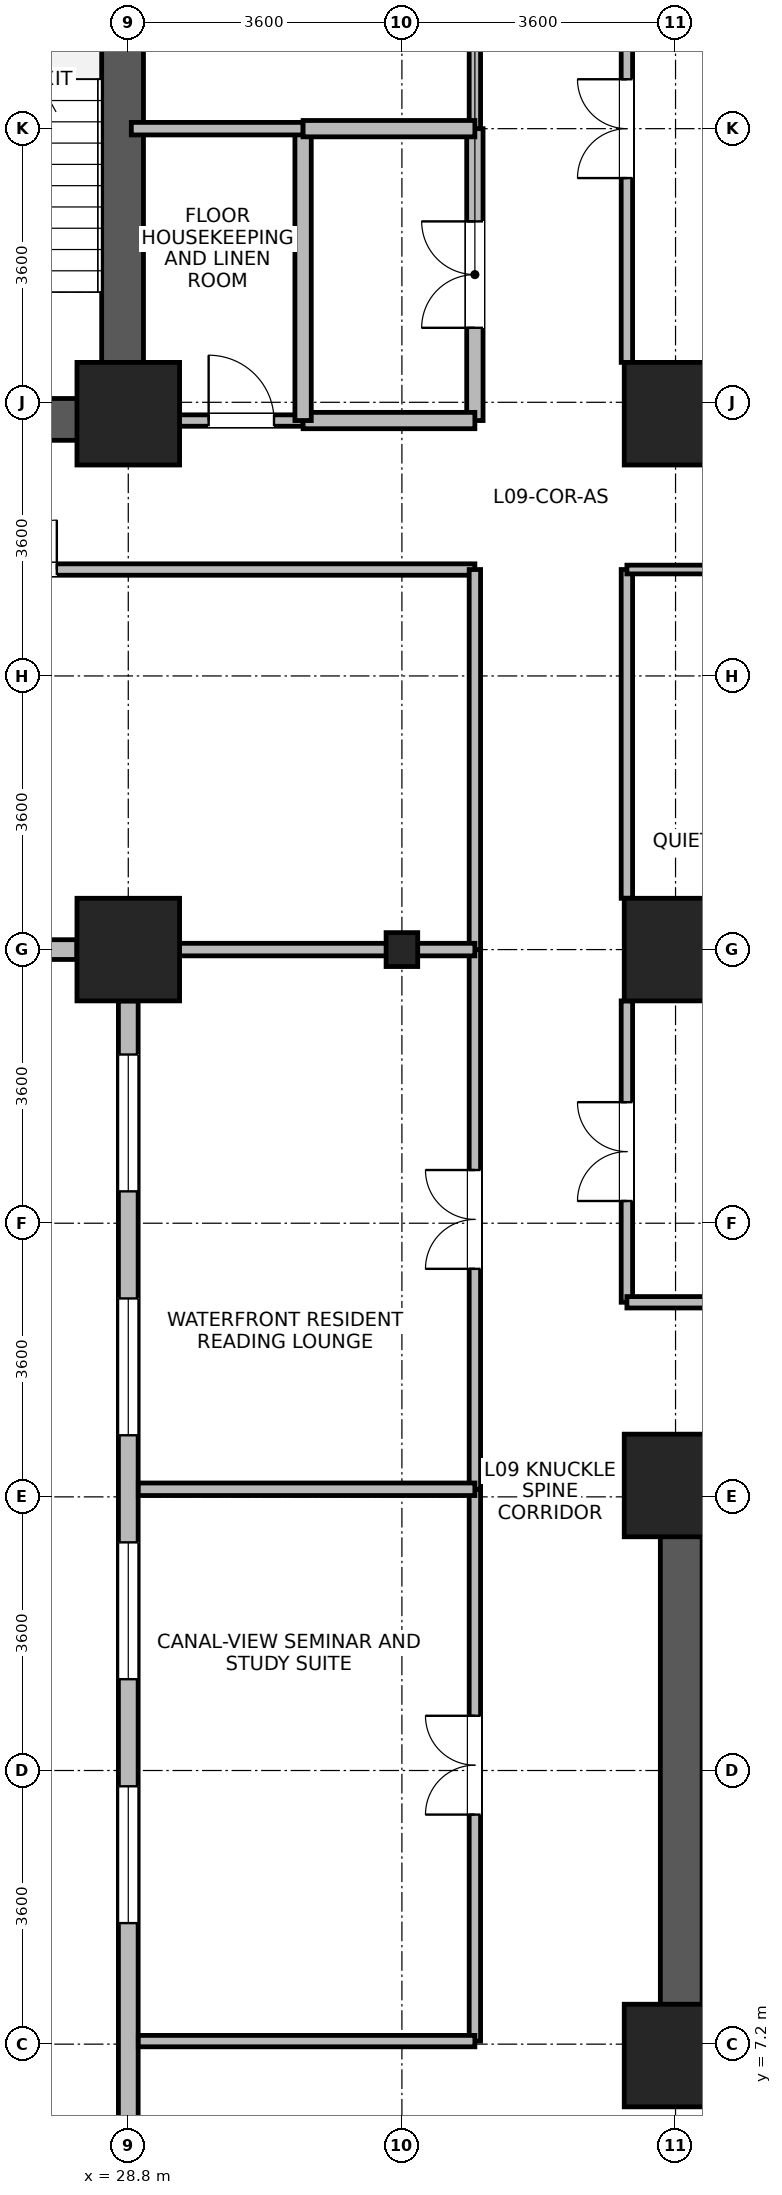
"""IFC4 building model, lengths in metres.
Left out: names, types, materials, properties, quantities, classifications, styles, units other than length and angle.
Written with IfcOpenShell. Run it as: python <this file> out.ifc"""

import sys

from ifc_helpers import new_model, si_unit, direction, frame, frame_2d, origin, origin_2d, place, context, subcontext, project, spatial, rectangle, i_section, extrude, source, transform, mapped, element, fill, save


model = new_model("IFC4")
c1 = context("Model", 3, precision=1e-05, world=origin(), true_north=direction((0.0, 1.0)))
c2 = subcontext(c1, "Body", "Model", "MODEL_VIEW")
j1 = project(units=[si_unit("LENGTHUNIT", "METRE"), si_unit("PLANEANGLEUNIT", "RADIAN")], contexts=[c1])
p1 = place(None, origin())
s1 = spatial("IfcSite", under=j1, at=p1, CompositionType="ELEMENT")
p2 = place(p1, origin())
s2 = spatial("IfcBuilding", under=s1, at=p2, CompositionType="ELEMENT")
p3 = place(p2, frame((0.0, 0.0, 40.1)))
s3 = spatial("IfcBuildingStorey", under=s2, at=p3, CompositionType="ELEMENT", Elevation=40.1)
p4 = place(p3, frame((28.725, 28.3, 0.0), z_axis=(0.0, 0.0, 1.0), x_axis=(0.0, 1.0, 0.0)))
e1 = element("IfcWall", 1, at=p4, inside=s3, PredefinedType="SHEAR", context=c2, shape_type="SweptSolid", body=[
    extrude(rectangle(XDim=8.1, YDim=0.55, at=frame_2d((4.05, 0.0))), origin(), (0.0, 0.0, 1.0), 3.45),
])
p5 = place(p3, frame((25.25, 28.575, 0.0), z_axis=(0.0, 0.0, 1.0), x_axis=(1.0, 0.0, 0.0)))
e2 = element("IfcWall", 2, at=p5, inside=s3, PredefinedType="SHEAR", context=c2, shape_type="SweptSolid", body=[
    extrude(rectangle(XDim=3.2, YDim=0.55, at=frame_2d((1.6, 0.0))), origin(), (0.0, 0.0, 1.0), 3.45),
])
p6 = place(p3, frame((36.075, 6.75, 0.0), z_axis=(0.0, 0.0, 1.0), x_axis=(0.0, 1.0, 0.0)))
e3 = element("IfcWall", 3, at=p6, inside=s3, PredefinedType="SHEAR", context=c2, shape_type="SweptSolid", body=[
    extrude(rectangle(XDim=8.1, YDim=0.55, at=frame_2d((4.05, 0.0))), origin(), (0.0, 0.0, 1.0), 3.45),
])
m1 = source(origin(), c2, "Body", "SweptSolid", [
    extrude(rectangle(XDim=1.35, YDim=1.35, at=origin_2d()), origin(), (0.0, 0.0, 1.0), 3.7),
])
for number, where, z_axis, x_axis in (
    (4, (28.8, 21.6, 0.0), (0.0, 0.0, 1.0), (1.0, 0.0, 0.0)),
    (5, (28.8, 28.65, 0.0), (0.0, 0.0, 1.0), (1.0, 0.0, 0.0)),
    (6, (36.0, 21.6, 0.0), (0.0, 0.0, 1.0), (1.0, 0.0, 0.0)),
    (7, (36.0, 28.65, 0.0), (0.0, 0.0, 1.0), (1.0, 0.0, 0.0)),
    (8, (36.0, 7.05, 0.0), (0.0, 0.0, 1.0), (1.0, 0.0, 0.0)),
    (9, (36.0, 14.55, 0.0), (0.0, 0.0, 1.0), (1.0, 0.0, 0.0)),
):
    element("IfcColumn", number, at=place(p3, frame(where, z_axis=z_axis, x_axis=x_axis)), inside=s3, PredefinedType="COLUMN", context=c2, shape_type="MappedRepresentation", body=[
        mapped(m1, transform((0.0, 0.0, 0.0), x_axis=(1.0, 0.0, 0.0), y_axis=(0.0, 1.0, 0.0), z_axis=(0.0, 0.0, 1.0), scale=1.0)),
    ])
m2 = source(origin(), c2, "Body", "SweptSolid", [
    extrude(i_section(OverallWidth=0.416, OverallDepth=0.446, WebThickness=0.029, FlangeThickness=0.04, FilletRadius=0.015, at=origin_2d()), origin(), (0.0, 0.0, 1.0), 3.7),
])
p7 = place(p3, frame((32.4, 21.6, 0.0), z_axis=(0.0, 0.0, 1.0), x_axis=(1.0, 0.0, 0.0)))
e10 = element("IfcColumn", 10, at=p7, inside=s3, PredefinedType="COLUMN", context=c2, shape_type="MappedRepresentation", body=[
    mapped(m2, transform((0.0, 0.0, 0.0), x_axis=(1.0, 0.0, 0.0), y_axis=(0.0, 1.0, 0.0), z_axis=(0.0, 0.0, 1.0), scale=1.0)),
])
p8 = place(p3, frame((28.124, 21.6, 0.0), z_axis=(0.0, 0.0, 1.0), x_axis=(-1.0, 0.0, 0.0)))
e11 = element("IfcWall", 11, at=p8, inside=s3, PredefinedType="STANDARD", context=c2, shape_type="SweptSolid", body=[
    extrude(rectangle(XDim=2.715, YDim=0.26, at=frame_2d((1.357, 0.0))), origin(), (0.0, 0.0, 1.0), 2.93),
])
p9 = place(p8, frame((0.883, 0.0, 0.85)))
e12 = element("IfcOpeningElement", 12, at=p9, cuts=e11, PredefinedType="OPENING", context=c2, shape_type="SweptSolid", body=[
    extrude(rectangle(XDim=0.95, YDim=1.75, at=frame_2d((0.475, 0.875))), frame((0.0, 0.14, 0.0), z_axis=(0.0, -1.0, 0.0), x_axis=(1.0, 0.0, 0.0)), (0.0, 0.0, 1.0), 0.28),
])
p10 = place(p3, frame((28.8, 1.67, 0.0), z_axis=(0.0, 0.0, 1.0), x_axis=(0.0, 1.0, 0.0)))
e13 = element("IfcWall", 13, at=p10, inside=s3, PredefinedType="STANDARD", context=c2, shape_type="SweptSolid", body=[
    extrude(rectangle(XDim=19.254, YDim=0.26, at=frame_2d((9.627, 0.0))), origin(), (0.0, 0.0, 1.0), 3.43),
])
p11 = place(p10, frame((0.705, 0.0, 0.85)))
e14 = element("IfcOpeningElement", 14, at=p11, cuts=e13, PredefinedType="OPENING", context=c2, shape_type="SweptSolid", body=[
    extrude(rectangle(XDim=1.8, YDim=1.85, at=frame_2d((0.9, 0.925))), frame((0.0, 0.14, 0.0), z_axis=(0.0, -1.0, 0.0), x_axis=(1.0, 0.0, 0.0)), (0.0, 0.0, 1.0), 0.28),
])
p12 = place(p10, frame((7.123, 0.0, 0.85)))
e15 = element("IfcOpeningElement", 15, at=p12, cuts=e13, PredefinedType="OPENING", context=c2, shape_type="SweptSolid", body=[
    extrude(rectangle(XDim=1.8, YDim=1.85, at=frame_2d((0.9, 0.925))), frame((0.0, 0.14, 0.0), z_axis=(0.0, -1.0, 0.0), x_axis=(1.0, 0.0, 0.0)), (0.0, 0.0, 1.0), 0.28),
])
p13 = place(p10, frame((10.332, 0.0, 0.85)))
e16 = element("IfcOpeningElement", 16, at=p13, cuts=e13, PredefinedType="OPENING", context=c2, shape_type="SweptSolid", body=[
    extrude(rectangle(XDim=1.8, YDim=1.85, at=frame_2d((0.9, 0.925))), frame((0.0, 0.14, 0.0), z_axis=(0.0, -1.0, 0.0), x_axis=(1.0, 0.0, 0.0)), (0.0, 0.0, 1.0), 0.28),
])
p14 = place(p10, frame((13.541, 0.0, 0.85)))
e17 = element("IfcOpeningElement", 17, at=p14, cuts=e13, PredefinedType="OPENING", context=c2, shape_type="SweptSolid", body=[
    extrude(rectangle(XDim=1.8, YDim=1.85, at=frame_2d((0.9, 0.925))), frame((0.0, 0.14, 0.0), z_axis=(0.0, -1.0, 0.0), x_axis=(1.0, 0.0, 0.0)), (0.0, 0.0, 1.0), 0.28),
])
p15 = place(p10, frame((16.75, 0.0, 0.85)))
e18 = element("IfcOpeningElement", 18, at=p15, cuts=e13, PredefinedType="OPENING", context=c2, shape_type="SweptSolid", body=[
    extrude(rectangle(XDim=1.8, YDim=1.85, at=frame_2d((0.9, 0.925))), frame((0.0, 0.14, 0.0), z_axis=(0.0, -1.0, 0.0), x_axis=(1.0, 0.0, 0.0)), (0.0, 0.0, 1.0), 0.28),
])
p16 = place(p3, frame((21.06, 26.6, 0.0), z_axis=(0.0, 0.0, 1.0), x_axis=(1.0, 0.0, 0.0)))
e19 = element("IfcWall", 19, at=p16, inside=s3, PredefinedType="PARTITIONING", context=c2, shape_type="SweptSolid", body=[
    extrude(rectangle(XDim=12.3, YDim=0.15, at=frame_2d((6.15, 0.0))), origin(), (0.0, 0.0, 1.0), 3.43),
])
p17 = place(p16, frame((5.5, 0.0, 0.0)))
e20 = element("IfcOpeningElement", 20, at=p17, cuts=e19, PredefinedType="OPENING", context=c2, shape_type="SweptSolid", body=[
    extrude(rectangle(XDim=1.3, YDim=2.12, at=frame_2d((0.65, 1.06))), frame((0.0, 0.085, 0.0), z_axis=(0.0, -1.0, 0.0), x_axis=(1.0, 0.0, 0.0)), (0.0, 0.0, 1.0), 0.17),
])
p18 = place(p3, frame((35.36, 16.96, 0.0), z_axis=(0.0, 0.0, 1.0), x_axis=(0.0, 1.0, 0.0)))
e21 = element("IfcWall", 21, at=p18, inside=s3, PredefinedType="PARTITIONING", context=c2, shape_type="SweptSolid", body=[
    extrude(rectangle(XDim=3.965, YDim=0.15, at=frame_2d((1.982, 0.0))), origin(), (0.0, 0.0, 1.0), 3.43),
])
p19 = place(p18, frame((1.333, 0.0, 0.0)))
e22 = element("IfcOpeningElement", 22, at=p19, cuts=e21, PredefinedType="OPENING", context=c2, shape_type="SweptSolid", body=[
    extrude(rectangle(XDim=1.3, YDim=2.12, at=frame_2d((0.65, 1.06))), frame((0.0, 0.085, 0.0), z_axis=(0.0, -1.0, 0.0), x_axis=(1.0, 0.0, 0.0)), (0.0, 0.0, 1.0), 0.17),
])
p20 = place(p3, frame((35.36, 22.275, 0.0), z_axis=(0.0, 0.0, 1.0), x_axis=(0.0, 1.0, 0.0)))
e23 = element("IfcWall", 23, at=p20, inside=s3, PredefinedType="PARTITIONING", context=c2, shape_type="SweptSolid", body=[
    extrude(rectangle(XDim=4.325, YDim=0.15, at=frame_2d((2.163, 0.0))), origin(), (0.0, 0.0, 1.0), 3.43),
])
p21 = place(p3, frame((35.36, 29.325, 0.0), z_axis=(0.0, 0.0, 1.0), x_axis=(0.0, 1.0, 0.0)))
e24 = element("IfcWall", 24, at=p21, inside=s3, PredefinedType="PARTITIONING", context=c2, shape_type="SweptSolid", body=[
    extrude(rectangle(XDim=6.15, YDim=0.15, at=frame_2d((3.075, 0.0))), origin(), (0.0, 0.0, 1.0), 3.43),
])
p22 = place(p21, frame((2.425, 0.0, 0.0)))
e25 = element("IfcOpeningElement", 25, at=p22, cuts=e24, PredefinedType="OPENING", context=c2, shape_type="SweptSolid", body=[
    extrude(rectangle(XDim=1.3, YDim=2.12, at=frame_2d((0.65, 1.06))), frame((0.0, 0.085, 0.0), z_axis=(0.0, -1.0, 0.0), x_axis=(1.0, 0.0, 0.0)), (0.0, 0.0, 1.0), 0.17),
])
p23 = place(p3, frame((33.36, 7.24, 0.0), z_axis=(0.0, 0.0, 1.0), x_axis=(0.0, 1.0, 0.0)))
e26 = element("IfcWall", 26, at=p23, inside=s3, PredefinedType="PARTITIONING", context=c2, shape_type="SweptSolid", body=[
    extrude(rectangle(XDim=7.26, YDim=0.15, at=frame_2d((3.63, 0.0))), origin(), (0.0, 0.0, 1.0), 3.43),
])
p24 = place(p23, frame((2.98, 0.0, 0.0)))
e27 = element("IfcOpeningElement", 27, at=p24, cuts=e26, PredefinedType="OPENING", context=c2, shape_type="SweptSolid", body=[
    extrude(rectangle(XDim=1.3, YDim=2.12, at=frame_2d((0.65, 1.06))), frame((0.0, 0.085, 0.0), z_axis=(0.0, -1.0, 0.0), x_axis=(1.0, 0.0, 0.0)), (0.0, 0.0, 1.0), 0.17),
])
p25 = place(p3, frame((33.36, 14.5, 0.0), z_axis=(0.0, 0.0, 1.0), x_axis=(0.0, 1.0, 0.0)))
e28 = element("IfcWall", 28, at=p25, inside=s3, PredefinedType="PARTITIONING", context=c2, shape_type="SweptSolid", body=[
    extrude(rectangle(XDim=7.1, YDim=0.15, at=frame_2d((3.55, 0.0))), origin(), (0.0, 0.0, 1.0), 3.43),
])
p26 = place(p25, frame((2.9, 0.0, 0.0)))
e29 = element("IfcOpeningElement", 29, at=p26, cuts=e28, PredefinedType="OPENING", context=c2, shape_type="SweptSolid", body=[
    extrude(rectangle(XDim=1.3, YDim=2.12, at=frame_2d((0.65, 1.06))), frame((0.0, 0.085, 0.0), z_axis=(0.0, -1.0, 0.0), x_axis=(1.0, 0.0, 0.0)), (0.0, 0.0, 1.0), 0.17),
])
p27 = place(p3, frame((35.36, 16.96, 0.0), z_axis=(0.0, 0.0, 1.0), x_axis=(1.0, 0.0, 0.0)))
e30 = element("IfcWall", 30, at=p27, inside=s3, PredefinedType="PARTITIONING", context=c2, shape_type="SweptSolid", body=[
    extrude(rectangle(XDim=5.14, YDim=0.15, at=frame_2d((2.57, 0.0))), origin(), (0.0, 0.0, 1.0), 3.43),
])
p28 = place(p3, frame((33.36, 21.6, 0.0), z_axis=(0.0, 0.0, 1.0), x_axis=(0.0, 1.0, 0.0)))
e31 = element("IfcWall", 31, at=p28, inside=s3, PredefinedType="PARTITIONING", context=c2, shape_type="SweptSolid", body=[
    extrude(rectangle(XDim=5.0, YDim=0.15, at=frame_2d((2.5, 0.0))), origin(), (0.0, 0.0, 1.0), 3.43),
])
p29 = place(p3, frame((28.932, 7.24, 0.0), z_axis=(0.0, 0.0, 1.0), x_axis=(1.0, 0.0, 0.0)))
e32 = element("IfcWall", 32, at=p29, inside=s3, PredefinedType="PARTITIONING", context=c2, shape_type="SweptSolid", body=[
    extrude(rectangle(XDim=4.428, YDim=0.15, at=frame_2d((2.214, 0.0))), origin(), (0.0, 0.0, 1.0), 3.43),
])
p30 = place(p3, frame((33.36, 32.4, 0.0), z_axis=(0.0, 0.0, 1.0), x_axis=(0.0, 1.0, 0.0)))
e33 = element("IfcWall", 33, at=p30, inside=s3, PredefinedType="PARTITIONING", context=c2, shape_type="SweptSolid", body=[
    extrude(rectangle(XDim=3.84, YDim=0.15, at=frame_2d((1.92, 0.0))), origin(), (0.0, 0.0, 1.0), 3.43),
])
p31 = place(p3, frame((33.36, 28.56, 0.0), z_axis=(0.0, 0.0, 1.0), x_axis=(0.0, 1.0, 0.0)))
e34 = element("IfcWall", 34, at=p31, inside=s3, PredefinedType="PARTITIONING", context=c2, shape_type="SweptSolid", body=[
    extrude(rectangle(XDim=3.84, YDim=0.215, at=frame_2d((1.92, 0.0))), origin(), (0.0, 0.0, 1.0), 3.43),
])
p32 = place(p31, frame((1.22, 0.0, 0.0)))
e35 = element("IfcOpeningElement", 35, at=p32, cuts=e34, PredefinedType="OPENING", context=c2, shape_type="SweptSolid", body=[
    extrude(rectangle(XDim=1.4, YDim=2.15, at=frame_2d((0.7, 1.075))), frame((0.0, 0.118, 0.0), z_axis=(0.0, -1.0, 0.0), x_axis=(1.0, 0.0, 0.0)), (0.0, 0.0, 1.0), 0.235),
])
p33 = place(p3, frame((29.475, 28.56, 0.0), z_axis=(0.0, 0.0, 1.0), x_axis=(1.0, 0.0, 0.0)))
e36 = element("IfcWall", 36, at=p33, inside=s3, PredefinedType="PARTITIONING", context=c2, shape_type="SweptSolid", body=[
    extrude(rectangle(XDim=1.625, YDim=0.15, at=frame_2d((0.812, 0.0))), origin(), (0.0, 0.0, 1.0), 2.78),
])
p34 = place(p33, frame((0.383, 0.0, 0.0)))
e37 = element("IfcOpeningElement", 37, at=p34, cuts=e36, PredefinedType="OPENING", context=c2, shape_type="SweptSolid", body=[
    extrude(rectangle(XDim=0.86, YDim=2.02, at=frame_2d((0.43, 1.01))), frame((0.0, 0.085, 0.0), z_axis=(0.0, -1.0, 0.0), x_axis=(1.0, 0.0, 0.0)), (0.0, 0.0, 1.0), 0.17),
])
p35 = place(p3, frame((31.1, 28.56, 0.0), z_axis=(0.0, 0.0, 1.0), x_axis=(1.0, 0.0, 0.0)))
e38 = element("IfcWall", 38, at=p35, inside=s3, PredefinedType="PARTITIONING", context=c2, shape_type="SweptSolid", body=[
    extrude(rectangle(XDim=2.26, YDim=0.215, at=frame_2d((1.13, 0.0))), origin(), (0.0, 0.0, 1.0), 2.78),
])
p36 = place(p3, frame((35.36, 26.6, 0.0), z_axis=(0.0, 0.0, 1.0), x_axis=(1.0, 0.0, 0.0)))
e39 = element("IfcWall", 39, at=p36, inside=s3, PredefinedType="PARTITIONING", context=c2, shape_type="SweptSolid", body=[
    extrude(rectangle(XDim=5.14, YDim=0.115, at=frame_2d((2.57, 0.0))), origin(), (0.0, 0.0, 1.0), 3.43),
])
p37 = place(p3, frame((28.932, 14.5, 0.0), z_axis=(0.0, 0.0, 1.0), x_axis=(1.0, 0.0, 0.0)))
e40 = element("IfcWall", 40, at=p37, inside=s3, PredefinedType="PARTITIONING", context=c2, shape_type="SweptSolid", body=[
    extrude(rectangle(XDim=4.428, YDim=0.165, at=frame_2d((2.214, 0.0))), origin(), (0.0, 0.0, 1.0), 3.43),
])
p38 = place(p3, frame((28.932, 21.6, 0.0), z_axis=(0.0, 0.0, 1.0), x_axis=(1.0, 0.0, 0.0)))
e41 = element("IfcWall", 41, at=p38, inside=s3, PredefinedType="PARTITIONING", context=c2, shape_type="SweptSolid", body=[
    extrude(rectangle(XDim=4.428, YDim=0.165, at=frame_2d((2.214, 0.0))), origin(), (0.0, 0.0, 1.0), 2.93),
])
p39 = place(p3, frame((31.1, 28.56, 0.0), z_axis=(0.0, 0.0, 1.0), x_axis=(0.0, 1.0, 0.0)))
e42 = element("IfcWall", 42, at=p39, inside=s3, PredefinedType="PARTITIONING", context=c2, shape_type="SweptSolid", body=[
    extrude(rectangle(XDim=3.84, YDim=0.215, at=frame_2d((1.92, 0.0))), origin(), (0.0, 0.0, 1.0), 3.43),
])
p40 = place(p3, frame((28.84, 32.4, 0.0), z_axis=(0.0, 0.0, 1.0), x_axis=(1.0, 0.0, 0.0)))
e43 = element("IfcWall", 43, at=p40, inside=s3, PredefinedType="PARTITIONING", context=c2, shape_type="SweptSolid", body=[
    extrude(rectangle(XDim=2.26, YDim=0.165, at=frame_2d((1.13, 0.0))), origin(), (0.0, 0.0, 1.0), 3.43),
])
p41 = place(p3, frame((31.1, 32.4, 0.0), z_axis=(0.0, 0.0, 1.0), x_axis=(1.0, 0.0, 0.0)))
e44 = element("IfcWall", 44, at=p41, inside=s3, PredefinedType="PARTITIONING", context=c2, shape_type="SweptSolid", body=[
    extrude(rectangle(XDim=2.26, YDim=0.215, at=frame_2d((1.13, 0.0))), origin(), (0.0, 0.0, 1.0), 3.43),
])
p42 = place(p12, origin())
e45 = element("IfcWindow", 45, at=p42, inside=s3, PartitioningType="SINGLE_PANEL", PredefinedType="WINDOW", context=c2, shape_type="SweptSolid", body=[
    extrude(rectangle(XDim=1.8, YDim=1.85, at=frame_2d((0.9, 0.925))), frame((0.0, 0.03, 0.0), z_axis=(0.0, -1.0, 0.0), x_axis=(1.0, 0.0, 0.0)), (0.0, 0.0, 1.0), 0.06),
])
fill(e15, e45)
p43 = place(p13, origin())
e46 = element("IfcWindow", 46, at=p43, inside=s3, PartitioningType="SINGLE_PANEL", PredefinedType="WINDOW", context=c2, shape_type="SweptSolid", body=[
    extrude(rectangle(XDim=1.8, YDim=1.85, at=frame_2d((0.9, 0.925))), frame((0.0, 0.03, 0.0), z_axis=(0.0, -1.0, 0.0), x_axis=(1.0, 0.0, 0.0)), (0.0, 0.0, 1.0), 0.06),
])
fill(e16, e46)
p44 = place(p14, origin())
e47 = element("IfcWindow", 47, at=p44, inside=s3, PartitioningType="SINGLE_PANEL", PredefinedType="WINDOW", context=c2, shape_type="SweptSolid", body=[
    extrude(rectangle(XDim=1.8, YDim=1.85, at=frame_2d((0.9, 0.925))), frame((0.0, 0.03, 0.0), z_axis=(0.0, -1.0, 0.0), x_axis=(1.0, 0.0, 0.0)), (0.0, 0.0, 1.0), 0.06),
])
fill(e17, e47)
p45 = place(p15, origin())
e48 = element("IfcWindow", 48, at=p45, inside=s3, PartitioningType="SINGLE_PANEL", PredefinedType="WINDOW", context=c2, shape_type="SweptSolid", body=[
    extrude(rectangle(XDim=1.8, YDim=1.85, at=frame_2d((0.9, 0.925))), frame((0.0, 0.03, 0.0), z_axis=(0.0, -1.0, 0.0), x_axis=(1.0, 0.0, 0.0)), (0.0, 0.0, 1.0), 0.06),
])
fill(e18, e48)
p46 = place(p17, origin())
e49 = element("IfcDoor", 49, at=p46, inside=s3, OperationType="DOUBLE_DOOR_SINGLE_SWING", PredefinedType="DOOR", context=c2, shape_type="SweptSolid", body=[
    extrude(rectangle(XDim=1.3, YDim=2.12, at=frame_2d((0.65, 1.06))), frame((0.0, 0.025, 0.0), z_axis=(0.0, -1.0, 0.0), x_axis=(1.0, 0.0, 0.0)), (0.0, 0.0, 1.0), 0.05),
])
fill(e20, e49)
p47 = place(p19, origin())
e50 = element("IfcDoor", 50, at=p47, inside=s3, OperationType="DOUBLE_DOOR_SINGLE_SWING", PredefinedType="DOOR", context=c2, shape_type="SweptSolid", body=[
    extrude(rectangle(XDim=1.3, YDim=2.12, at=frame_2d((0.65, 1.06))), frame((0.0, 0.025, 0.0), z_axis=(0.0, -1.0, 0.0), x_axis=(1.0, 0.0, 0.0)), (0.0, 0.0, 1.0), 0.05),
])
fill(e22, e50)
p48 = place(p22, origin())
e51 = element("IfcDoor", 51, at=p48, inside=s3, OperationType="DOUBLE_DOOR_SINGLE_SWING", PredefinedType="DOOR", context=c2, shape_type="SweptSolid", body=[
    extrude(rectangle(XDim=1.3, YDim=2.12, at=frame_2d((0.65, 1.06))), frame((0.0, 0.025, 0.0), z_axis=(0.0, -1.0, 0.0), x_axis=(1.0, 0.0, 0.0)), (0.0, 0.0, 1.0), 0.05),
])
fill(e25, e51)
p49 = place(p24, origin())
e52 = element("IfcDoor", 52, at=p49, inside=s3, OperationType="DOUBLE_DOOR_SINGLE_SWING", PredefinedType="DOOR", context=c2, shape_type="SweptSolid", body=[
    extrude(rectangle(XDim=1.3, YDim=2.12, at=frame_2d((0.65, 1.06))), frame((0.0, 0.025, 0.0), z_axis=(0.0, -1.0, 0.0), x_axis=(1.0, 0.0, 0.0)), (0.0, 0.0, 1.0), 0.05),
])
fill(e27, e52)
p50 = place(p26, origin())
e53 = element("IfcDoor", 53, at=p50, inside=s3, OperationType="DOUBLE_DOOR_SINGLE_SWING", PredefinedType="DOOR", context=c2, shape_type="SweptSolid", body=[
    extrude(rectangle(XDim=1.3, YDim=2.12, at=frame_2d((0.65, 1.06))), frame((0.0, 0.025, 0.0), z_axis=(0.0, -1.0, 0.0), x_axis=(1.0, 0.0, 0.0)), (0.0, 0.0, 1.0), 0.05),
])
fill(e29, e53)
p51 = place(p32, origin())
e54 = element("IfcDoor", 54, at=p51, inside=s3, OperationType="DOUBLE_DOOR_SINGLE_SWING", PredefinedType="DOOR", context=c2, shape_type="SweptSolid", body=[
    extrude(rectangle(XDim=1.4, YDim=2.15, at=frame_2d((0.7, 1.075))), frame((0.0, 0.025, 0.0), z_axis=(0.0, -1.0, 0.0), x_axis=(1.0, 0.0, 0.0)), (0.0, 0.0, 1.0), 0.05),
])
fill(e35, e54)
p52 = place(p34, origin())
e55 = element("IfcDoor", 55, at=p52, inside=s3, OperationType="SINGLE_SWING_LEFT", PredefinedType="DOOR", context=c2, shape_type="SweptSolid", body=[
    extrude(rectangle(XDim=0.86, YDim=2.02, at=frame_2d((0.43, 1.01))), frame((0.0, 0.025, 0.0), z_axis=(0.0, -1.0, 0.0), x_axis=(1.0, 0.0, 0.0)), (0.0, 0.0, 1.0), 0.05),
])
fill(e37, e55)
save(model, sys.argv[1])
